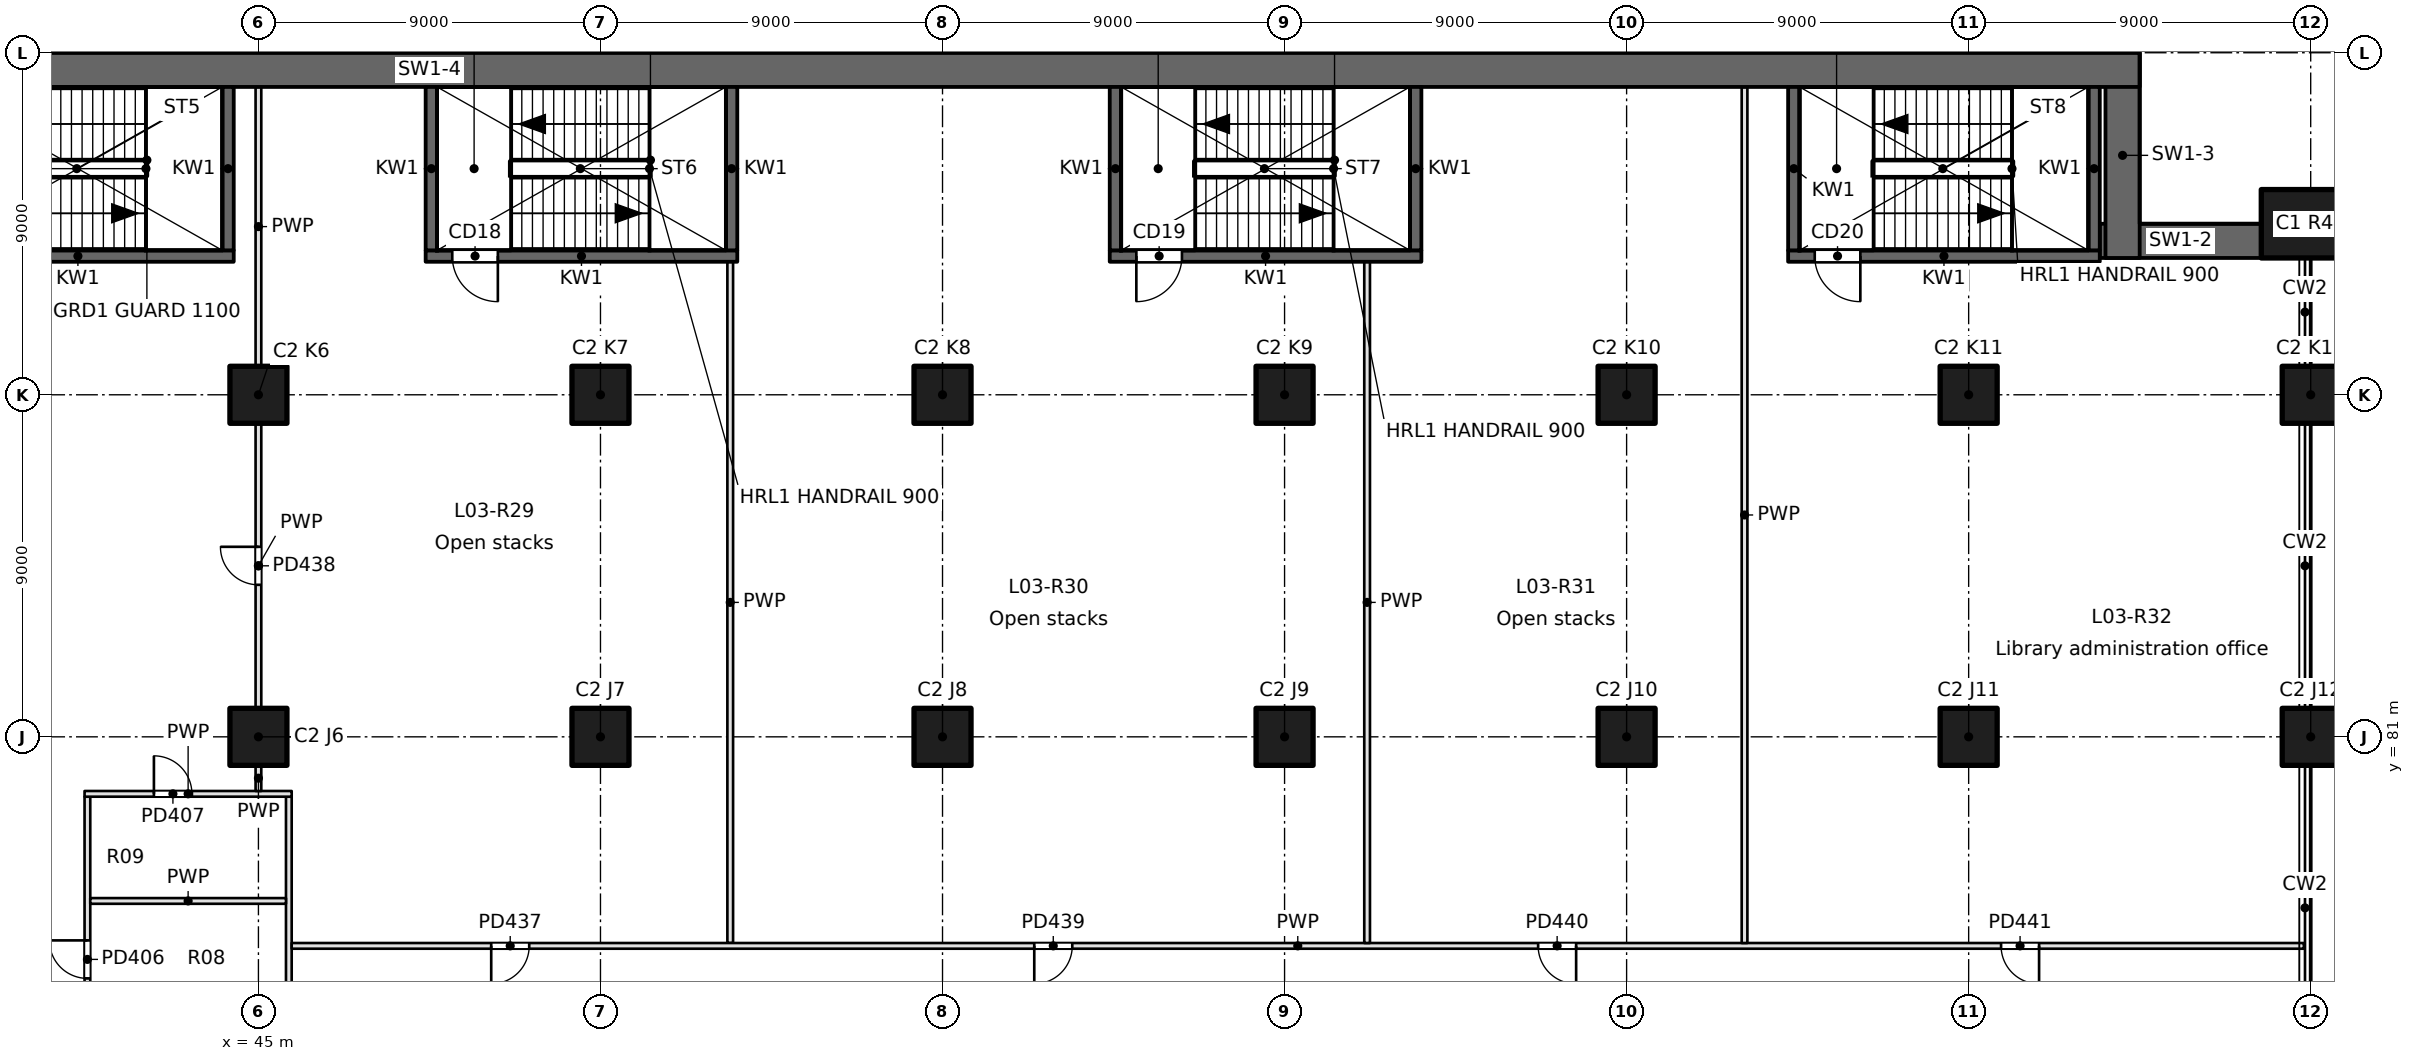
"""IFC4 building model, lengths in metres.
Left out: names, types, materials, properties, quantities, classifications, styles, units other than length and angle.
Written with IfcOpenShell. Run it as: python <this file> out.ifc"""

import sys

from ifc_helpers import new_model, si_unit, direction, frame, frame_2d, origin, origin_2d, place, context, subcontext, project, spatial, rectangle, extrude, element, fill, save


model = new_model("IFC4")
c1 = context("Model", 3, precision=1e-05, world=origin(), true_north=direction((0.0, 1.0)))
c2 = subcontext(c1, "Body", "Model", "MODEL_VIEW")
j1 = project(units=[si_unit("LENGTHUNIT", "METRE"), si_unit("PLANEANGLEUNIT", "RADIAN")], contexts=[c1])
p1 = place(None, origin())
s1 = spatial("IfcSite", under=j1, at=p1, CompositionType="ELEMENT")
p2 = place(p1, origin())
s2 = spatial("IfcBuilding", under=s1, at=p2, CompositionType="ELEMENT")
p3 = place(p2, frame((0.0, 0.0, 16.8)))
s3 = spatial("IfcBuildingStorey", under=s2, at=p3, CompositionType="ELEMENT", Elevation=16.8)
for number, where, z_axis, x_axis in (
    (1, (99.0, 81.0, 0.0), (0.0, 0.0, 1.0), (1.0, 0.0, 0.0)),
    (2, (99.0, 90.0, 0.0), (0.0, 0.0, 1.0), (1.0, 0.0, 0.0)),
):
    element("IfcColumn", number, at=place(p3, frame(where, z_axis=z_axis, x_axis=x_axis)), inside=s3, PredefinedType="COLUMN", context=c2, shape_type="SweptSolid", body=[
        extrude(rectangle(XDim=1.5, YDim=1.5, at=origin_2d()), origin(), (0.0, 0.0, 1.0), 4.8),
    ])
p4 = place(p3, frame((99.0, 94.5, 0.0), z_axis=(0.0, 0.0, 1.0), x_axis=(1.0, 0.0, 0.0)))
e3 = element("IfcColumn", 3, at=p4, inside=s3, PredefinedType="COLUMN", context=c2, shape_type="SweptSolid", body=[
    extrude(rectangle(XDim=2.6, YDim=1.8, at=origin_2d()), origin(), (0.0, 0.0, 1.0), 4.8),
])
for number, where, z_axis, x_axis in (
    (4, (45.0, 81.0, 0.0), (0.0, 0.0, 1.0), (1.0, 0.0, 0.0)),
    (5, (45.0, 90.0, 0.0), (0.0, 0.0, 1.0), (1.0, 0.0, 0.0)),
    (6, (54.0, 81.0, 0.0), (0.0, 0.0, 1.0), (1.0, 0.0, 0.0)),
    (7, (54.0, 90.0, 0.0), (0.0, 0.0, 1.0), (1.0, 0.0, 0.0)),
    (8, (63.0, 81.0, 0.0), (0.0, 0.0, 1.0), (1.0, 0.0, 0.0)),
    (9, (63.0, 90.0, 0.0), (0.0, 0.0, 1.0), (1.0, 0.0, 0.0)),
    (10, (72.0, 81.0, 0.0), (0.0, 0.0, 1.0), (1.0, 0.0, 0.0)),
    (11, (72.0, 90.0, 0.0), (0.0, 0.0, 1.0), (1.0, 0.0, 0.0)),
    (12, (81.0, 81.0, 0.0), (0.0, 0.0, 1.0), (1.0, 0.0, 0.0)),
    (13, (81.0, 90.0, 0.0), (0.0, 0.0, 1.0), (1.0, 0.0, 0.0)),
    (14, (90.0, 81.0, 0.0), (0.0, 0.0, 1.0), (1.0, 0.0, 0.0)),
    (15, (90.0, 90.0, 0.0), (0.0, 0.0, 1.0), (1.0, 0.0, 0.0)),
):
    element("IfcColumn", number, at=place(p3, frame(where, z_axis=z_axis, x_axis=x_axis)), inside=s3, PredefinedType="COLUMN", context=c2, shape_type="SweptSolid", body=[
        extrude(rectangle(XDim=1.5, YDim=1.5, at=origin_2d()), origin(), (0.0, 0.0, 1.0), 4.8),
    ])
p5 = place(p3, frame((97.7, 94.05, 0.0), z_axis=(0.0, 0.0, 1.0), x_axis=(-1.0, 0.0, 0.0)))
e16 = element("IfcWall", 16, at=p5, inside=s3, PredefinedType="SHEAR", context=c2, shape_type="SweptSolid", body=[
    extrude(rectangle(XDim=4.25, YDim=0.9, at=frame_2d((2.125, 0.0))), origin(), (0.0, 0.0, 1.0), 4.8),
])
p6 = place(p3, frame((94.05, 93.6, 0.0), z_axis=(0.0, 0.0, 1.0), x_axis=(0.0, 1.0, 0.0)))
e17 = element("IfcWall", 17, at=p6, inside=s3, PredefinedType="SHEAR", context=c2, shape_type="SweptSolid", body=[
    extrude(rectangle(XDim=5.4, YDim=0.9, at=frame_2d((2.7, 0.0))), origin(), (0.0, 0.0, 1.0), 4.8),
])
p7 = place(p3, frame((94.5, 98.55, 0.0), z_axis=(0.0, 0.0, 1.0), x_axis=(-1.0, 0.0, 0.0)))
e18 = element("IfcWall", 18, at=p7, inside=s3, PredefinedType="SHEAR", context=c2, shape_type="SweptSolid", body=[
    extrude(rectangle(XDim=90.0, YDim=0.9, at=frame_2d((45.0, 0.0))), origin(), (0.0, 0.0, 1.0), 4.8),
])
p8 = place(p3, frame((36.15, 93.65, -0.35), z_axis=(0.0, 0.0, 1.0), x_axis=(1.0, 0.0, 0.0)))
e19 = element("IfcWall", 19, at=p8, inside=s3, PredefinedType="SOLIDWALL", context=c2, shape_type="SweptSolid", body=[
    extrude(rectangle(XDim=8.2, YDim=0.3, at=frame_2d((4.1, 0.0))), origin(), (0.0, 0.0, 1.0), 4.8),
])
p9 = place(p8, frame((0.7, 0.0, 0.35)))
e20 = element("IfcOpeningElement", 20, at=p9, cuts=e19, PredefinedType="OPENING", context=c2, shape_type="SweptSolid", body=[
    extrude(rectangle(XDim=1.2, YDim=2.1, at=frame_2d((0.6, 1.05))), frame((0.0, 0.15, 0.0), z_axis=(0.0, -1.0, 0.0), x_axis=(1.0, 0.0, 0.0)), (0.0, 0.0, 1.0), 0.3),
])
p10 = place(p3, frame((49.4, 93.65, -0.35), z_axis=(0.0, 0.0, 1.0), x_axis=(1.0, 0.0, 0.0)))
e21 = element("IfcWall", 21, at=p10, inside=s3, PredefinedType="SOLIDWALL", context=c2, shape_type="SweptSolid", body=[
    extrude(rectangle(XDim=8.2, YDim=0.3, at=frame_2d((4.1, 0.0))), origin(), (0.0, 0.0, 1.0), 4.8),
])
p11 = place(p10, frame((0.7, 0.0, 0.35)))
e22 = element("IfcOpeningElement", 22, at=p11, cuts=e21, PredefinedType="OPENING", context=c2, shape_type="SweptSolid", body=[
    extrude(rectangle(XDim=1.2, YDim=2.1, at=frame_2d((0.6, 1.05))), frame((0.0, 0.15, 0.0), z_axis=(0.0, -1.0, 0.0), x_axis=(1.0, 0.0, 0.0)), (0.0, 0.0, 1.0), 0.3),
])
p12 = place(p3, frame((67.4, 93.65, -0.35), z_axis=(0.0, 0.0, 1.0), x_axis=(1.0, 0.0, 0.0)))
e23 = element("IfcWall", 23, at=p12, inside=s3, PredefinedType="SOLIDWALL", context=c2, shape_type="SweptSolid", body=[
    extrude(rectangle(XDim=8.2, YDim=0.3, at=frame_2d((4.1, 0.0))), origin(), (0.0, 0.0, 1.0), 4.8),
])
p13 = place(p12, frame((0.7, 0.0, 0.35)))
e24 = element("IfcOpeningElement", 24, at=p13, cuts=e23, PredefinedType="OPENING", context=c2, shape_type="SweptSolid", body=[
    extrude(rectangle(XDim=1.2, YDim=2.1, at=frame_2d((0.6, 1.05))), frame((0.0, 0.15, 0.0), z_axis=(0.0, -1.0, 0.0), x_axis=(1.0, 0.0, 0.0)), (0.0, 0.0, 1.0), 0.3),
])
p14 = place(p3, frame((85.25, 93.65, -0.35), z_axis=(0.0, 0.0, 1.0), x_axis=(1.0, 0.0, 0.0)))
e25 = element("IfcWall", 25, at=p14, inside=s3, PredefinedType="SOLIDWALL", context=c2, shape_type="SweptSolid", body=[
    extrude(rectangle(XDim=8.2, YDim=0.3, at=frame_2d((4.1, 0.0))), origin(), (0.0, 0.0, 1.0), 4.8),
])
p15 = place(p14, frame((0.7, 0.0, 0.35)))
e26 = element("IfcOpeningElement", 26, at=p15, cuts=e25, PredefinedType="OPENING", context=c2, shape_type="SweptSolid", body=[
    extrude(rectangle(XDim=1.2, YDim=2.1, at=frame_2d((0.6, 1.05))), frame((0.0, 0.15, 0.0), z_axis=(0.0, -1.0, 0.0), x_axis=(1.0, 0.0, 0.0)), (0.0, 0.0, 1.0), 0.3),
])
for number, where, z_axis, x_axis in (
    (27, (44.2, 93.8, -0.35), (0.0, 0.0, 1.0), (0.0, 1.0, 0.0)),
    (28, (49.55, 93.8, -0.35), (0.0, 0.0, 1.0), (0.0, 1.0, 0.0)),
    (29, (57.45, 93.8, -0.35), (0.0, 0.0, 1.0), (0.0, 1.0, 0.0)),
    (30, (67.55, 93.8, -0.35), (0.0, 0.0, 1.0), (0.0, 1.0, 0.0)),
    (31, (75.45, 93.8, -0.35), (0.0, 0.0, 1.0), (0.0, 1.0, 0.0)),
    (32, (85.4, 93.8, -0.35), (0.0, 0.0, 1.0), (0.0, 1.0, 0.0)),
    (33, (93.3, 93.8, -0.35), (0.0, 0.0, 1.0), (0.0, 1.0, 0.0)),
):
    element("IfcWall", number, at=place(p3, frame(where, z_axis=z_axis, x_axis=x_axis)), inside=s3, PredefinedType="SOLIDWALL", context=c2, shape_type="SweptSolid", body=[
        extrude(rectangle(XDim=4.3, YDim=0.3, at=frame_2d((2.15, 0.0))), origin(), (0.0, 0.0, 1.0), 4.8),
    ])
p16 = place(p3, frame((45.8, 79.425, 0.0), z_axis=(0.0, 0.0, 1.0), x_axis=(0.0, -1.0, 0.0)))
e34 = element("IfcWall", 34, at=p16, inside=s3, PredefinedType="PARTITIONING", context=c2, shape_type="SweptSolid", body=[
    extrude(rectangle(XDim=15.35, YDim=0.15, at=frame_2d((7.675, 0.0))), origin(), (0.0, 0.0, 1.0), 4.45),
])
p17 = place(p3, frame((40.5, 64.075, 0.0), z_axis=(0.0, 0.0, 1.0), x_axis=(0.0, 1.0, 0.0)))
e35 = element("IfcWall", 35, at=p17, inside=s3, PredefinedType="PARTITIONING", context=c2, shape_type="SweptSolid", body=[
    extrude(rectangle(XDim=15.35, YDim=0.15, at=frame_2d((7.675, 0.0))), origin(), (0.0, 0.0, 1.0), 4.45),
])
p18 = place(p17, frame((1.75, 0.0, 0.0)))
e36 = element("IfcOpeningElement", 36, at=p18, cuts=e35, PredefinedType="OPENING", context=c2, shape_type="SweptSolid", body=[
    extrude(rectangle(XDim=1.0, YDim=2.1, at=frame_2d((0.5, 1.05))), frame((0.0, 0.075, 0.0), z_axis=(0.0, -1.0, 0.0), x_axis=(1.0, 0.0, 0.0)), (0.0, 0.0, 1.0), 0.15),
])
p19 = place(p17, frame((6.372, 0.0, 0.0)))
e37 = element("IfcOpeningElement", 37, at=p19, cuts=e35, PredefinedType="OPENING", context=c2, shape_type="SweptSolid", body=[
    extrude(rectangle(XDim=1.0, YDim=2.1, at=frame_2d((0.5, 1.05))), frame((0.0, 0.075, 0.0), z_axis=(0.0, -1.0, 0.0), x_axis=(1.0, 0.0, 0.0)), (0.0, 0.0, 1.0), 0.15),
])
p20 = place(p17, frame((10.569, 0.0, 0.0)))
e38 = element("IfcOpeningElement", 38, at=p20, cuts=e35, PredefinedType="OPENING", context=c2, shape_type="SweptSolid", body=[
    extrude(rectangle(XDim=1.0, YDim=2.1, at=frame_2d((0.5, 1.05))), frame((0.0, 0.075, 0.0), z_axis=(0.0, -1.0, 0.0), x_axis=(1.0, 0.0, 0.0)), (0.0, 0.0, 1.0), 0.15),
])
p21 = place(p3, frame((40.575, 76.682, 0.0), z_axis=(0.0, 0.0, 1.0), x_axis=(1.0, 0.0, 0.0)))
e39 = element("IfcWall", 39, at=p21, inside=s3, PredefinedType="PARTITIONING", context=c2, shape_type="SweptSolid", body=[
    extrude(rectangle(XDim=5.15, YDim=0.15, at=frame_2d((2.575, 0.0))), origin(), (0.0, 0.0, 1.0), 4.45),
])
p22 = place(p3, frame((40.425, 79.5, 0.0), z_axis=(0.0, 0.0, 1.0), x_axis=(1.0, 0.0, 0.0)))
e40 = element("IfcWall", 40, at=p22, inside=s3, PredefinedType="PARTITIONING", context=c2, shape_type="SweptSolid", body=[
    extrude(rectangle(XDim=5.45, YDim=0.15, at=frame_2d((2.725, 0.0))), origin(), (0.0, 0.0, 1.0), 4.45),
])
p23 = place(p22, frame((1.825, 0.0, 0.0)))
e41 = element("IfcOpeningElement", 41, at=p23, cuts=e40, PredefinedType="OPENING", context=c2, shape_type="SweptSolid", body=[
    extrude(rectangle(XDim=1.0, YDim=2.1, at=frame_2d((0.5, 1.05))), frame((0.0, 0.075, 0.0), z_axis=(0.0, -1.0, 0.0), x_axis=(1.0, 0.0, 0.0)), (0.0, 0.0, 1.0), 0.15),
])
p24 = place(p3, frame((45.0, 79.575, 0.0), z_axis=(0.0, 0.0, 1.0), x_axis=(0.0, 1.0, 0.0)))
e42 = element("IfcWall", 42, at=p24, inside=s3, PredefinedType="PARTITIONING", context=c2, shape_type="SweptSolid", body=[
    extrude(rectangle(XDim=0.675, YDim=0.15, at=frame_2d((0.337, 0.0))), origin(), (0.0, 0.0, 1.0), 4.45),
])
p25 = place(p3, frame((45.0, 81.75, 0.0), z_axis=(0.0, 0.0, 1.0), x_axis=(0.0, 1.0, 0.0)))
e43 = element("IfcWall", 43, at=p25, inside=s3, PredefinedType="PARTITIONING", context=c2, shape_type="SweptSolid", body=[
    extrude(rectangle(XDim=7.5, YDim=0.15, at=frame_2d((3.75, 0.0))), origin(), (0.0, 0.0, 1.0), 4.45),
])
p26 = place(p25, frame((3.25, 0.0, 0.0)))
e44 = element("IfcOpeningElement", 44, at=p26, cuts=e43, PredefinedType="OPENING", context=c2, shape_type="SweptSolid", body=[
    extrude(rectangle(XDim=1.0, YDim=2.1, at=frame_2d((0.5, 1.05))), frame((0.0, 0.075, 0.0), z_axis=(0.0, -1.0, 0.0), x_axis=(1.0, 0.0, 0.0)), (0.0, 0.0, 1.0), 0.15),
])
p27 = place(p3, frame((45.0, 90.75, 0.0), z_axis=(0.0, 0.0, 1.0), x_axis=(0.0, 1.0, 0.0)))
e45 = element("IfcWall", 45, at=p27, inside=s3, PredefinedType="PARTITIONING", context=c2, shape_type="SweptSolid", body=[
    extrude(rectangle(XDim=7.35, YDim=0.15, at=frame_2d((3.675, 0.0))), origin(), (0.0, 0.0, 1.0), 4.45),
])
p28 = place(p3, frame((57.414, 75.575, 0.0), z_axis=(0.0, 0.0, 1.0), x_axis=(0.0, 1.0, 0.0)))
e46 = element("IfcWall", 46, at=p28, inside=s3, PredefinedType="PARTITIONING", context=c2, shape_type="SweptSolid", body=[
    extrude(rectangle(XDim=17.925, YDim=0.15, at=frame_2d((8.962, 0.0))), origin(), (0.0, 0.0, 1.0), 4.45),
])
p29 = place(p3, frame((98.82, 75.5, 0.0), z_axis=(0.0, 0.0, 1.0), x_axis=(-1.0, 0.0, 0.0)))
e47 = element("IfcWall", 47, at=p29, inside=s3, PredefinedType="PARTITIONING", context=c2, shape_type="SweptSolid", body=[
    extrude(rectangle(XDim=52.945, YDim=0.15, at=frame_2d((26.473, 0.0))), origin(), (0.0, 0.0, 1.0), 4.45),
])
p30 = place(p29, frame((46.695, 0.0, 0.0)))
e48 = element("IfcOpeningElement", 48, at=p30, cuts=e47, PredefinedType="OPENING", context=c2, shape_type="SweptSolid", body=[
    extrude(rectangle(XDim=1.0, YDim=2.1, at=frame_2d((0.5, 1.05))), frame((0.0, 0.075, 0.0), z_axis=(0.0, -1.0, 0.0), x_axis=(1.0, 0.0, 0.0)), (0.0, 0.0, 1.0), 0.15),
])
p31 = place(p29, frame((32.406, 0.0, 0.0)))
e49 = element("IfcOpeningElement", 49, at=p31, cuts=e47, PredefinedType="OPENING", context=c2, shape_type="SweptSolid", body=[
    extrude(rectangle(XDim=1.0, YDim=2.1, at=frame_2d((0.5, 1.05))), frame((0.0, 0.075, 0.0), z_axis=(0.0, -1.0, 0.0), x_axis=(1.0, 0.0, 0.0)), (0.0, 0.0, 1.0), 0.15),
])
p32 = place(p29, frame((19.148, 0.0, 0.0)))
e50 = element("IfcOpeningElement", 50, at=p32, cuts=e47, PredefinedType="OPENING", context=c2, shape_type="SweptSolid", body=[
    extrude(rectangle(XDim=1.0, YDim=2.1, at=frame_2d((0.5, 1.05))), frame((0.0, 0.075, 0.0), z_axis=(0.0, -1.0, 0.0), x_axis=(1.0, 0.0, 0.0)), (0.0, 0.0, 1.0), 0.15),
])
p33 = place(p29, frame((6.967, 0.0, 0.0)))
e51 = element("IfcOpeningElement", 51, at=p33, cuts=e47, PredefinedType="OPENING", context=c2, shape_type="SweptSolid", body=[
    extrude(rectangle(XDim=1.0, YDim=2.1, at=frame_2d((0.5, 1.05))), frame((0.0, 0.075, 0.0), z_axis=(0.0, -1.0, 0.0), x_axis=(1.0, 0.0, 0.0)), (0.0, 0.0, 1.0), 0.15),
])
p34 = place(p3, frame((74.172, 75.575, 0.0), z_axis=(0.0, 0.0, 1.0), x_axis=(0.0, 1.0, 0.0)))
e52 = element("IfcWall", 52, at=p34, inside=s3, PredefinedType="PARTITIONING", context=c2, shape_type="SweptSolid", body=[
    extrude(rectangle(XDim=17.925, YDim=0.15, at=frame_2d((8.962, 0.0))), origin(), (0.0, 0.0, 1.0), 4.45),
])
p35 = place(p3, frame((84.103, 75.575, 0.0), z_axis=(0.0, 0.0, 1.0), x_axis=(0.0, 1.0, 0.0)))
e53 = element("IfcWall", 53, at=p35, inside=s3, PredefinedType="PARTITIONING", context=c2, shape_type="SweptSolid", body=[
    extrude(rectangle(XDim=22.525, YDim=0.15, at=frame_2d((11.263, 0.0))), origin(), (0.0, 0.0, 1.0), 4.45),
])
p36 = place(p11, frame((1.2, 0.0, 0.0), z_axis=(0.0, 0.0, 1.0), x_axis=(-1.0, 0.0, 0.0)))
e54 = element("IfcDoor", 54, at=p36, inside=s3, OperationType="SINGLE_SWING_LEFT", PredefinedType="DOOR", context=c2, shape_type="SweptSolid", body=[
    extrude(rectangle(XDim=1.2, YDim=2.1, at=frame_2d((0.6, 1.05))), frame((0.0, 0.025, 0.0), z_axis=(0.0, -1.0, 0.0), x_axis=(1.0, 0.0, 0.0)), (0.0, 0.0, 1.0), 0.05),
])
fill(e22, e54)
p37 = place(p13, frame((1.2, 0.0, 0.0), z_axis=(0.0, 0.0, 1.0), x_axis=(-1.0, 0.0, 0.0)))
e55 = element("IfcDoor", 55, at=p37, inside=s3, OperationType="SINGLE_SWING_RIGHT", PredefinedType="DOOR", context=c2, shape_type="SweptSolid", body=[
    extrude(rectangle(XDim=1.2, YDim=2.1, at=frame_2d((0.6, 1.05))), frame((0.0, 0.025, 0.0), z_axis=(0.0, -1.0, 0.0), x_axis=(1.0, 0.0, 0.0)), (0.0, 0.0, 1.0), 0.05),
])
fill(e24, e55)
p38 = place(p15, frame((1.2, 0.0, 0.0), z_axis=(0.0, 0.0, 1.0), x_axis=(-1.0, 0.0, 0.0)))
e56 = element("IfcDoor", 56, at=p38, inside=s3, OperationType="SINGLE_SWING_LEFT", PredefinedType="DOOR", context=c2, shape_type="SweptSolid", body=[
    extrude(rectangle(XDim=1.2, YDim=2.1, at=frame_2d((0.6, 1.05))), frame((0.0, 0.025, 0.0), z_axis=(0.0, -1.0, 0.0), x_axis=(1.0, 0.0, 0.0)), (0.0, 0.0, 1.0), 0.05),
])
fill(e26, e56)
p39 = place(p20, origin())
e57 = element("IfcDoor", 57, at=p39, inside=s3, OperationType="SINGLE_SWING_RIGHT", PredefinedType="DOOR", context=c2, shape_type="SweptSolid", body=[
    extrude(rectangle(XDim=1.0, YDim=2.1, at=frame_2d((0.5, 1.05))), frame((0.0, 0.025, 0.0), z_axis=(0.0, -1.0, 0.0), x_axis=(1.0, 0.0, 0.0)), (0.0, 0.0, 1.0), 0.05),
])
fill(e38, e57)
p40 = place(p23, origin())
e58 = element("IfcDoor", 58, at=p40, inside=s3, OperationType="SINGLE_SWING_LEFT", PredefinedType="DOOR", context=c2, shape_type="SweptSolid", body=[
    extrude(rectangle(XDim=1.0, YDim=2.1, at=frame_2d((0.5, 1.05))), frame((0.0, 0.025, 0.0), z_axis=(0.0, -1.0, 0.0), x_axis=(1.0, 0.0, 0.0)), (0.0, 0.0, 1.0), 0.05),
])
fill(e41, e58)
p41 = place(p30, origin())
e59 = element("IfcDoor", 59, at=p41, inside=s3, OperationType="SINGLE_SWING_RIGHT", PredefinedType="DOOR", context=c2, shape_type="SweptSolid", body=[
    extrude(rectangle(XDim=1.0, YDim=2.1, at=frame_2d((0.5, 1.05))), frame((0.0, 0.025, 0.0), z_axis=(0.0, -1.0, 0.0), x_axis=(1.0, 0.0, 0.0)), (0.0, 0.0, 1.0), 0.05),
])
fill(e48, e59)
p42 = place(p26, origin())
e60 = element("IfcDoor", 60, at=p42, inside=s3, OperationType="SINGLE_SWING_RIGHT", PredefinedType="DOOR", context=c2, shape_type="SweptSolid", body=[
    extrude(rectangle(XDim=1.0, YDim=2.1, at=frame_2d((0.5, 1.05))), frame((0.0, 0.025, 0.0), z_axis=(0.0, -1.0, 0.0), x_axis=(1.0, 0.0, 0.0)), (0.0, 0.0, 1.0), 0.05),
])
fill(e44, e60)
p43 = place(p31, origin())
e61 = element("IfcDoor", 61, at=p43, inside=s3, OperationType="SINGLE_SWING_RIGHT", PredefinedType="DOOR", context=c2, shape_type="SweptSolid", body=[
    extrude(rectangle(XDim=1.0, YDim=2.1, at=frame_2d((0.5, 1.05))), frame((0.0, 0.025, 0.0), z_axis=(0.0, -1.0, 0.0), x_axis=(1.0, 0.0, 0.0)), (0.0, 0.0, 1.0), 0.05),
])
fill(e49, e61)
p44 = place(p32, origin())
e62 = element("IfcDoor", 62, at=p44, inside=s3, OperationType="SINGLE_SWING_LEFT", PredefinedType="DOOR", context=c2, shape_type="SweptSolid", body=[
    extrude(rectangle(XDim=1.0, YDim=2.1, at=frame_2d((0.5, 1.05))), frame((0.0, 0.025, 0.0), z_axis=(0.0, -1.0, 0.0), x_axis=(1.0, 0.0, 0.0)), (0.0, 0.0, 1.0), 0.05),
])
fill(e50, e62)
p45 = place(p33, origin())
e63 = element("IfcDoor", 63, at=p45, inside=s3, OperationType="SINGLE_SWING_LEFT", PredefinedType="DOOR", context=c2, shape_type="SweptSolid", body=[
    extrude(rectangle(XDim=1.0, YDim=2.1, at=frame_2d((0.5, 1.05))), frame((0.0, 0.025, 0.0), z_axis=(0.0, -1.0, 0.0), x_axis=(1.0, 0.0, 0.0)), (0.0, 0.0, 1.0), 0.05),
])
fill(e51, e63)
save(model, sys.argv[1])
